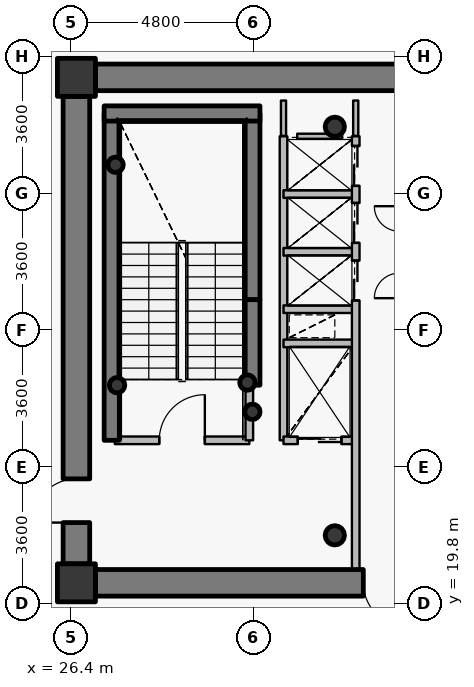
"""IFC4 building model, lengths in metres.
Left out: names, types, materials, properties, quantities, classifications, styles, units other than length and angle.
Written with IfcOpenShell. Run it as: python <this file> out.ifc"""

import sys

from ifc_helpers import new_model, si_unit, direction, frame, frame_2d, origin, origin_2d, place, context, subcontext, project, spatial, rectangle, hollow_circle, extrude, source, transform, mapped, element, fill, save


model = new_model("IFC4")
c1 = context("Model", 3, precision=1e-05, world=origin(), true_north=direction((0.0, 1.0)))
c2 = subcontext(c1, "Body", "Model", "MODEL_VIEW")
j1 = project(units=[si_unit("LENGTHUNIT", "METRE"), si_unit("PLANEANGLEUNIT", "RADIAN")], contexts=[c1])
p1 = place(None, origin())
s1 = spatial("IfcSite", under=j1, at=p1, CompositionType="ELEMENT")
p2 = place(p1, origin())
s2 = spatial("IfcBuilding", under=s1, at=p2, CompositionType="ELEMENT")
p3 = place(p2, frame((0.0, 0.0, 217.8)))
s3 = spatial("IfcBuildingStorey", under=s2, at=p3, CompositionType="ELEMENT", Elevation=217.8)
for number, where, z_axis, x_axis in (
    (1, (26.55, 20.35, 0.0), (0.0, 0.0, 1.0), (1.0, 0.0, 0.0)),
    (2, (26.55, 33.65, 0.0), (0.0, 0.0, 1.0), (1.0, 0.0, 0.0)),
):
    element("IfcColumn", number, at=place(p3, frame(where, z_axis=z_axis, x_axis=x_axis)), inside=s3, PredefinedType="COLUMN", context=c2, shape_type="SweptSolid", body=[
        extrude(rectangle(XDim=1.0, YDim=1.0, at=origin_2d()), origin(), (0.0, 0.0, 1.0), 3.75),
    ])
for number, where, z_axis, x_axis in (
    (3, (33.35, 21.6, 0.0), (0.0, 0.0, 1.0), (1.0, 0.0, 0.0)),
    (4, (33.35, 32.35, 0.0), (0.0, 0.0, 1.0), (1.0, 0.0, 0.0)),
):
    element("IfcColumn", number, at=place(p3, frame(where, z_axis=z_axis, x_axis=x_axis)), inside=s3, PredefinedType="COLUMN", context=c2, shape_type="SweptSolid", body=[
        extrude(hollow_circle(Radius=0.254, WallThickness=0.02, at=origin_2d()), origin(), (0.0, 0.0, 1.0), 3.75),
    ])
p4 = place(p3, frame((27.48, 24.1, 0.0), z_axis=(0.0, 0.0, 1.0), x_axis=(0.0, 1.0, 0.0)))
e5 = element("IfcWall", 5, at=p4, inside=s3, PredefinedType="SHEAR", context=c2, shape_type="SweptSolid", body=[
    extrude(rectangle(XDim=8.6, YDim=0.4, at=frame_2d((4.3, 0.0))), origin(), (0.0, 0.0, 1.0), 3.75),
])
p5 = place(p3, frame((31.18, 27.8, 0.0), z_axis=(0.0, 0.0, 1.0), x_axis=(0.0, 1.0, 0.0)))
e6 = element("IfcWall", 6, at=p5, inside=s3, PredefinedType="SHEAR", context=c2, shape_type="SweptSolid", body=[
    extrude(rectangle(XDim=4.9, YDim=0.4, at=frame_2d((2.45, 0.0))), origin(), (0.0, 0.0, 1.0), 3.75),
])
p6 = place(p3, frame((27.28, 32.7, 0.0), z_axis=(0.0, 0.0, 1.0), x_axis=(1.0, 0.0, 0.0)))
e7 = element("IfcWall", 7, at=p6, inside=s3, PredefinedType="SHEAR", context=c2, shape_type="SweptSolid", body=[
    extrude(rectangle(XDim=4.1, YDim=0.4, at=frame_2d((2.05, 0.0))), origin(), (0.0, 0.0, 1.0), 3.75),
])
for number, where, z_axis, x_axis in (
    (8, (27.58, 31.35, 0.0), (0.0, 0.0, 1.0), (1.0, 0.0, 0.0)),
    (9, (31.05, 25.62, 0.0), (0.0, 0.0, 1.0), (1.0, 0.0, 0.0)),
    (10, (31.18, 24.85, 0.0), (0.0, 0.0, 1.0), (1.0, 0.0, 0.0)),
    (11, (27.62, 25.55, 0.0), (0.0, 0.0, 1.0), (1.0, 0.0, 0.0)),
):
    element("IfcColumn", number, at=place(p3, frame(where, z_axis=z_axis, x_axis=x_axis)), inside=s3, PredefinedType="COLUMN", context=c2, shape_type="SweptSolid", body=[
        extrude(hollow_circle(Radius=0.203, WallThickness=0.016, at=origin_2d()), origin(), (0.0, 0.0, 1.0), 3.75),
    ])
p7 = place(p3, frame((27.05, 33.65, 0.0), z_axis=(0.0, 0.0, 1.0), x_axis=(1.0, 0.0, 0.0)))
e12 = element("IfcWall", 12, at=p7, inside=s3, PredefinedType="SHEAR", context=c2, shape_type="SweptSolid", body=[
    extrude(rectangle(XDim=17.9, YDim=0.7, at=frame_2d((8.95, 0.0))), origin(), (0.0, 0.0, 1.0), 3.05),
])
p8 = place(p7, frame((13.675, 0.0, 0.0)))
e13 = element("IfcOpeningElement", 13, at=p8, cuts=e12, PredefinedType="OPENING", context=c2, shape_type="SweptSolid", body=[
    extrude(rectangle(XDim=1.15, YDim=2.15, at=origin_2d()), frame((0.575, 0.36, 1.075), z_axis=(0.0, -1.0, 0.0), x_axis=(1.0, 0.0, 0.0)), (0.0, 0.0, 1.0), 0.72),
])
p9 = place(p3, frame((44.95, 20.35, 0.0), z_axis=(0.0, 0.0, 1.0), x_axis=(-1.0, 0.0, 0.0)))
e14 = element("IfcWall", 14, at=p9, inside=s3, PredefinedType="SHEAR", context=c2, shape_type="SweptSolid", body=[
    extrude(rectangle(XDim=17.9, YDim=0.7, at=frame_2d((8.95, 0.0))), origin(), (0.0, 0.0, 1.0), 3.05),
])
p10 = place(p9, frame((9.7, 0.0, 0.0)))
e15 = element("IfcOpeningElement", 15, at=p10, cuts=e14, PredefinedType="OPENING", context=c2, shape_type="SweptSolid", body=[
    extrude(rectangle(XDim=1.15, YDim=2.15, at=origin_2d()), frame((0.575, 0.36, 1.075), z_axis=(0.0, -1.0, 0.0), x_axis=(1.0, 0.0, 0.0)), (0.0, 0.0, 1.0), 0.72),
])
p11 = place(p3, frame((26.55, 20.85, 0.0), z_axis=(0.0, 0.0, 1.0), x_axis=(0.0, 1.0, 0.0)))
e16 = element("IfcWall", 16, at=p11, inside=s3, PredefinedType="SHEAR", context=c2, shape_type="SweptSolid", body=[
    extrude(rectangle(XDim=12.3, YDim=0.7, at=frame_2d((6.15, 0.0))), origin(), (0.0, 0.0, 1.0), 3.05),
])
p12 = place(p11, frame((1.085, 0.0, 0.0)))
e17 = element("IfcOpeningElement", 17, at=p12, cuts=e16, PredefinedType="OPENING", context=c2, shape_type="SweptSolid", body=[
    extrude(rectangle(XDim=1.15, YDim=2.15, at=origin_2d()), frame((0.575, 0.36, 1.075), z_axis=(0.0, -1.0, 0.0), x_axis=(1.0, 0.0, 0.0)), (0.0, 0.0, 1.0), 0.72),
])
p13 = place(p3, frame((31.18, 25.55, 0.0), z_axis=(0.0, 0.0, 1.0), x_axis=(0.0, 1.0, 0.0)))
e18 = element("IfcWall", 18, at=p13, inside=s3, PredefinedType="SHEAR", context=c2, shape_type="SweptSolid", body=[
    extrude(rectangle(XDim=2.25, YDim=0.4, at=frame_2d((1.125, 0.0))), origin(), (0.0, 0.0, 1.0), 3.1),
])
p14 = place(p3, frame((27.56, 24.1, 0.0), z_axis=(0.0, 0.0, 1.0), x_axis=(1.0, 0.0, 0.0)))
e19 = element("IfcWall", 19, at=p14, inside=s3, PredefinedType="PARTITIONING", context=c2, shape_type="SweptSolid", body=[
    extrude(rectangle(XDim=3.54, YDim=0.2, at=frame_2d((1.77, 0.0))), origin(), (0.0, 0.0, 1.0), 3.5),
])
p15 = place(p14, frame((1.17, 0.0, 0.0)))
e20 = element("IfcOpeningElement", 20, at=p15, cuts=e19, PredefinedType="OPENING", context=c2, shape_type="SweptSolid", body=[
    extrude(rectangle(XDim=1.2, YDim=2.15, at=origin_2d()), frame((0.6, 0.11, 1.075), z_axis=(0.0, -1.0, 0.0), x_axis=(1.0, 0.0, 0.0)), (0.0, 0.0, 1.0), 0.22),
])
p16 = place(p3, frame((31.1, 24.1, 0.0), z_axis=(0.0, 0.0, 1.0), x_axis=(0.0, 1.0, 0.0)))
e21 = element("IfcWall", 21, at=p16, inside=s3, PredefinedType="PARTITIONING", context=c2, shape_type="SweptSolid", body=[
    extrude(rectangle(XDim=1.44, YDim=0.2, at=frame_2d((0.72, 0.0))), origin(), (0.0, 0.0, 1.0), 3.5),
])
p17 = place(p3, frame((32.0, 24.1, 0.0), z_axis=(0.0, 0.0, 1.0), x_axis=(0.0, 1.0, 0.0)))
e22 = element("IfcWall", 22, at=p17, inside=s3, PredefinedType="PARTITIONING", context=c2, shape_type="SweptSolid", body=[
    extrude(rectangle(XDim=8.0, YDim=0.2, at=frame_2d((4.0, 0.0))), origin(), (0.0, 0.0, 1.0), 3.5),
])
p18 = place(p3, frame((32.0, 24.1, 0.0), z_axis=(0.0, 0.0, 1.0), x_axis=(1.0, 0.0, 0.0)))
e23 = element("IfcWall", 23, at=p18, inside=s3, PredefinedType="PARTITIONING", context=c2, shape_type="SweptSolid", body=[
    extrude(rectangle(XDim=1.9, YDim=0.2, at=frame_2d((0.95, 0.0))), origin(), (0.0, 0.0, 1.0), 3.085),
])
p19 = place(p18, frame((0.375, 0.0, 0.0)))
e24 = element("IfcOpeningElement", 24, at=p19, cuts=e23, PredefinedType="OPENING", context=c2, shape_type="SweptSolid", body=[
    extrude(rectangle(XDim=1.15, YDim=2.15, at=origin_2d()), frame((0.575, 0.11, 1.075), z_axis=(0.0, -1.0, 0.0), x_axis=(1.0, 0.0, 0.0)), (0.0, 0.0, 1.0), 0.22),
])
for number, where, z_axis, x_axis in (
    (25, (32.0, 26.65, 0.0), (0.0, 0.0, 1.0), (1.0, 0.0, 0.0)),
    (26, (32.0, 27.55, 0.0), (0.0, 0.0, 1.0), (1.0, 0.0, 0.0)),
    (27, (32.0, 29.06, 0.0), (0.0, 0.0, 1.0), (1.0, 0.0, 0.0)),
    (28, (32.0, 30.58, 0.0), (0.0, 0.0, 1.0), (1.0, 0.0, 0.0)),
):
    element("IfcWall", number, at=place(p3, frame(where, z_axis=z_axis, x_axis=x_axis)), inside=s3, PredefinedType="PARTITIONING", context=c2, shape_type="SweptSolid", body=[
        extrude(rectangle(XDim=1.9, YDim=0.2, at=frame_2d((0.95, 0.0))), origin(), (0.0, 0.0, 1.0), 3.085),
    ])
p20 = place(p3, frame((33.9, 20.7, 0.0), z_axis=(0.0, 0.0, 1.0), x_axis=(0.0, 1.0, 0.0)))
e29 = element("IfcWall", 29, at=p20, inside=s3, PredefinedType="PARTITIONING", context=c2, shape_type="SweptSolid", body=[
    extrude(rectangle(XDim=11.4, YDim=0.2, at=frame_2d((5.7, 0.0))), origin(), (0.0, 0.0, 1.0), 3.085),
])
p21 = place(p20, frame((7.08, 0.0, 0.0)))
e30 = element("IfcOpeningElement", 30, at=p21, cuts=e29, PredefinedType="OPENING", context=c2, shape_type="SweptSolid", body=[
    extrude(rectangle(XDim=1.05, YDim=2.15, at=origin_2d()), frame((0.525, 0.11, 1.075), z_axis=(0.0, -1.0, 0.0), x_axis=(1.0, 0.0, 0.0)), (0.0, 0.0, 1.0), 0.22),
])
p22 = place(p20, frame((8.595, 0.0, 0.0)))
e31 = element("IfcOpeningElement", 31, at=p22, cuts=e29, PredefinedType="OPENING", context=c2, shape_type="SweptSolid", body=[
    extrude(rectangle(XDim=1.05, YDim=2.15, at=origin_2d()), frame((0.525, 0.11, 1.075), z_axis=(0.0, -1.0, 0.0), x_axis=(1.0, 0.0, 0.0)), (0.0, 0.0, 1.0), 0.22),
])
p23 = place(p20, frame((10.095, 0.0, 0.0)))
e32 = element("IfcOpeningElement", 32, at=p23, cuts=e29, PredefinedType="OPENING", context=c2, shape_type="SweptSolid", body=[
    extrude(rectangle(XDim=1.05, YDim=2.15, at=origin_2d()), frame((0.525, 0.11, 1.075), z_axis=(0.0, -1.0, 0.0), x_axis=(1.0, 0.0, 0.0)), (0.0, 0.0, 1.0), 0.22),
])
p24 = place(p3, frame((32.36, 32.1, 0.0), z_axis=(0.0, 0.0, 1.0), x_axis=(1.0, 0.0, 0.0)))
e33 = element("IfcWall", 33, at=p24, inside=s3, PredefinedType="PARTITIONING", context=c2, shape_type="SweptSolid", body=[
    extrude(rectangle(XDim=1.18, YDim=0.135, at=frame_2d((0.59, 0.0))), origin(), (0.0, 0.0, 1.0), 3.085),
])
p25 = place(p3, frame((32.0, 33.04, 0.0), z_axis=(0.0, 0.0, 1.0), x_axis=(0.0, -1.0, 0.0)))
e34 = element("IfcWall", 34, at=p25, inside=s3, PredefinedType="PARTITIONING", context=c2, shape_type="SweptSolid", body=[
    extrude(rectangle(XDim=0.93, YDim=0.135, at=frame_2d((0.465, 0.0))), origin(), (0.0, 0.0, 1.0), 3.035),
])
p26 = place(p3, frame((33.9, 32.11, 0.0), z_axis=(0.0, 0.0, 1.0), x_axis=(0.0, 1.0, 0.0)))
e35 = element("IfcWall", 35, at=p26, inside=s3, PredefinedType="PARTITIONING", context=c2, shape_type="SweptSolid", body=[
    extrude(rectangle(XDim=0.93, YDim=0.135, at=frame_2d((0.465, 0.0))), origin(), (0.0, 0.0, 1.0), 3.085),
])
p27 = place(p3, frame((27.04, 34.0, 0.0), z_axis=(0.0, 0.0, 1.0), x_axis=(-1.0, 0.0, 0.0)))
e36 = element("IfcWall", 36, at=p27, inside=s3, PredefinedType="PARTITIONING", context=c2, shape_type="SweptSolid", body=[
    extrude(rectangle(XDim=0.84, YDim=0.135, at=frame_2d((0.42, 0.0))), origin(), (0.0, 0.0, 1.0), 2.935),
])
p28 = place(p3, frame((26.2, 33.692, 0.0), z_axis=(0.0, 0.0, 1.0), x_axis=(0.0, -1.0, 0.0)))
e37 = element("IfcWall", 37, at=p28, inside=s3, PredefinedType="PARTITIONING", context=c2, shape_type="SweptSolid", body=[
    extrude(rectangle(XDim=0.532, YDim=0.135, at=frame_2d((0.266, 0.0))), origin(), (0.0, 0.0, 1.0), 3.5),
])
p29 = place(p3, frame((26.2, 20.84, 0.0), z_axis=(0.0, 0.0, 1.0), x_axis=(0.0, -1.0, 0.0)))
e38 = element("IfcWall", 38, at=p29, inside=s3, PredefinedType="PARTITIONING", context=c2, shape_type="SweptSolid", body=[
    extrude(rectangle(XDim=0.84, YDim=0.135, at=frame_2d((0.42, 0.0))), origin(), (0.0, 0.0, 1.0), 3.5),
])
p30 = place(p3, frame((26.508, 20.0, 0.0), z_axis=(0.0, 0.0, 1.0), x_axis=(1.0, 0.0, 0.0)))
e39 = element("IfcWall", 39, at=p30, inside=s3, PredefinedType="PARTITIONING", context=c2, shape_type="SweptSolid", body=[
    extrude(rectangle(XDim=0.532, YDim=0.135, at=frame_2d((0.266, 0.0))), origin(), (0.0, 0.0, 1.0), 2.935),
])
m1 = source(origin(), c2, "Body", "SweptSolid", [
    extrude(rectangle(XDim=1.15, YDim=2.15, at=origin_2d()), frame((0.575, 0.025, 1.075), z_axis=(0.0, -1.0, 0.0), x_axis=(1.0, 0.0, 0.0)), (0.0, 0.0, 1.0), 0.05),
])
p31 = place(p12, origin())
e40 = element("IfcDoor", 40, at=p31, inside=s3, OperationType="SINGLE_SWING_LEFT", PredefinedType="DOOR", context=c2, shape_type="MappedRepresentation", body=[
    mapped(m1, transform((0.0, 0.0, 0.0), x_axis=(1.0, 0.0, 0.0), y_axis=(0.0, 1.0, 0.0), z_axis=(0.0, 0.0, 1.0), scale=1.0)),
])
fill(e17, e40)
p32 = place(p10, origin())
e41 = element("IfcDoor", 41, at=p32, inside=s3, OperationType="SINGLE_SWING_LEFT", PredefinedType="DOOR", context=c2, shape_type="MappedRepresentation", body=[
    mapped(m1, transform((0.0, 0.0, 0.0), x_axis=(1.0, 0.0, 0.0), y_axis=(0.0, 1.0, 0.0), z_axis=(0.0, 0.0, 1.0), scale=1.0)),
])
fill(e15, e41)
m2 = source(origin(), c2, "Body", "SweptSolid", [
    extrude(rectangle(XDim=1.2, YDim=2.15, at=origin_2d()), frame((0.6, 0.025, 1.075), z_axis=(0.0, -1.0, 0.0), x_axis=(1.0, 0.0, 0.0)), (0.0, 0.0, 1.0), 0.05),
])
p33 = place(p15, origin())
e42 = element("IfcDoor", 42, at=p33, inside=s3, OperationType="SINGLE_SWING_RIGHT", PredefinedType="DOOR", context=c2, shape_type="MappedRepresentation", body=[
    mapped(m2, transform((0.0, 0.0, 0.0), x_axis=(1.0, 0.0, 0.0), y_axis=(0.0, 1.0, 0.0), z_axis=(0.0, 0.0, 1.0), scale=1.0)),
])
fill(e20, e42)
m3 = source(origin(), c2, "Body", "SweptSolid", [
    extrude(rectangle(XDim=1.15, YDim=2.15, at=origin_2d()), frame((0.575, 0.025, 1.075), z_axis=(0.0, -1.0, 0.0), x_axis=(1.0, 0.0, 0.0)), (0.0, 0.0, 1.0), 0.05),
])
p34 = place(p19, origin())
e43 = element("IfcDoor", 43, at=p34, inside=s3, OperationType="DOUBLE_DOOR_SLIDING", PredefinedType="USERDEFINED", context=c2, shape_type="MappedRepresentation", body=[
    mapped(m3, transform((0.0, 0.0, 0.0), x_axis=(1.0, 0.0, 0.0), y_axis=(0.0, 1.0, 0.0), z_axis=(0.0, 0.0, 1.0), scale=1.0)),
])
fill(e24, e43)
m4 = source(origin(), c2, "Body", "SweptSolid", [
    extrude(rectangle(XDim=1.05, YDim=2.15, at=origin_2d()), frame((0.525, 0.025, 1.075), z_axis=(0.0, -1.0, 0.0), x_axis=(1.0, 0.0, 0.0)), (0.0, 0.0, 1.0), 0.05),
])
p35 = place(p21, origin())
e44 = element("IfcDoor", 44, at=p35, inside=s3, OperationType="DOUBLE_DOOR_SLIDING", PredefinedType="USERDEFINED", context=c2, shape_type="MappedRepresentation", body=[
    mapped(m4, transform((0.0, 0.0, 0.0), x_axis=(1.0, 0.0, 0.0), y_axis=(0.0, 1.0, 0.0), z_axis=(0.0, 0.0, 1.0), scale=1.0)),
])
fill(e30, e44)
p36 = place(p22, origin())
e45 = element("IfcDoor", 45, at=p36, inside=s3, OperationType="DOUBLE_DOOR_SLIDING", PredefinedType="USERDEFINED", context=c2, shape_type="MappedRepresentation", body=[
    mapped(m4, transform((0.0, 0.0, 0.0), x_axis=(1.0, 0.0, 0.0), y_axis=(0.0, 1.0, 0.0), z_axis=(0.0, 0.0, 1.0), scale=1.0)),
])
fill(e31, e45)
p37 = place(p23, origin())
e46 = element("IfcDoor", 46, at=p37, inside=s3, OperationType="DOUBLE_DOOR_SLIDING", PredefinedType="USERDEFINED", context=c2, shape_type="MappedRepresentation", body=[
    mapped(m4, transform((0.0, 0.0, 0.0), x_axis=(1.0, 0.0, 0.0), y_axis=(0.0, 1.0, 0.0), z_axis=(0.0, 0.0, 1.0), scale=1.0)),
])
fill(e32, e46)
save(model, sys.argv[1])
